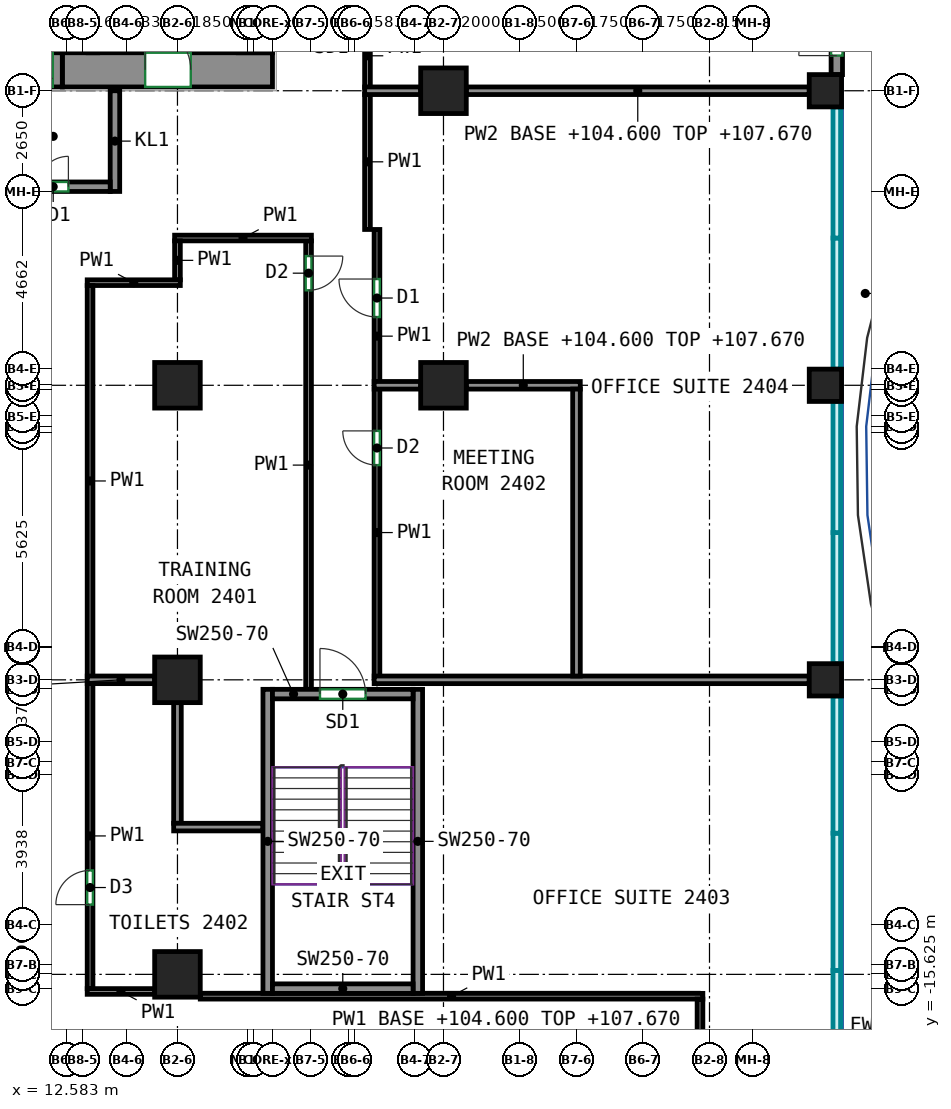
"""IFC4 building model, lengths in metres.
Left out: names, types, materials, properties, quantities, classifications, styles, units other than length and angle.
Written with IfcOpenShell. Run it as: python <this file> out.ifc"""

import sys

from ifc_helpers import new_model, si_unit, direction, frame, frame_2d, origin, origin_2d, place, context, subcontext, project, spatial, rectangle, extrude, source, transform, mapped, element, fill, save


model = new_model("IFC4")
c1 = context("Model", 3, precision=1e-05, world=origin(), true_north=direction((0.0, 1.0)))
c2 = subcontext(c1, "Body", "Model", "MODEL_VIEW")
j1 = project(units=[si_unit("LENGTHUNIT", "METRE"), si_unit("PLANEANGLEUNIT", "RADIAN")], contexts=[c1])
p1 = place(None, origin())
s1 = spatial("IfcSite", under=j1, at=p1, CompositionType="ELEMENT")
p2 = place(p1, origin())
s2 = spatial("IfcBuilding", under=s1, at=p2, CompositionType="ELEMENT")
p3 = place(p2, frame((0.0, 0.0, 104.6)))
s3 = spatial("IfcBuildingStorey", under=s2, at=p3, CompositionType="ELEMENT", Elevation=104.6)
m1 = source(origin(), c2, "Body", "SweptSolid", [
    extrude(rectangle(XDim=1.2, YDim=1.2, at=origin_2d()), origin(), (0.0, 0.0, 1.0), 3.72),
])
for number, where, z_axis, x_axis in (
    (1, (15.5, -15.25, 0.0), (0.0, 0.0, 1.0), (1.0, 0.0, 0.0)),
    (2, (15.5, -7.5, 0.0), (0.0, 0.0, 1.0), (1.0, 0.0, 0.0)),
    (3, (15.5, 0.25, 0.0), (0.0, 0.0, 1.0), (1.0, 0.0, 0.0)),
    (4, (22.5, 0.25, 0.0), (0.0, 0.0, 1.0), (1.0, 0.0, 0.0)),
    (5, (22.5, 8.0, 0.0), (0.0, 0.0, 1.0), (1.0, 0.0, 0.0)),
):
    element("IfcColumn", number, at=place(p3, frame(where, z_axis=z_axis, x_axis=x_axis)), inside=s3, PredefinedType="COLUMN", context=c2, shape_type="MappedRepresentation", body=[
        mapped(m1, transform((0.0, 0.0, 0.0))),
    ])
m2 = source(origin(), c2, "Body", "SweptSolid", [
    extrude(rectangle(XDim=0.85, YDim=0.85, at=origin_2d()), origin(), (0.0, 0.0, 1.0), 3.72),
])
for number, where, z_axis, x_axis in (
    (6, (32.55, -7.5, 0.0), (0.0, 0.0, 1.0), (1.0, 0.0, 0.0)),
    (7, (32.55, 0.25, 0.0), (0.0, 0.0, 1.0), (1.0, 0.0, 0.0)),
    (8, (32.55, 8.0, 0.0), (0.0, 0.0, 1.0), (1.0, 0.0, 0.0)),
):
    element("IfcColumn", number, at=place(p3, frame(where, z_axis=z_axis, x_axis=x_axis)), inside=s3, PredefinedType="COLUMN", context=c2, shape_type="MappedRepresentation", body=[
        mapped(m2, transform((0.0, 0.0, 0.0))),
    ])
m3 = source(origin(), c2, "Body", "SweptSolid", [
    extrude(rectangle(XDim=5.53, YDim=0.9, at=frame_2d((2.765, 0.0))), origin(), (0.0, 0.0, 1.0), 3.72),
])
p4 = place(p3, frame((12.47, 8.55, 0.0), z_axis=(0.0, 0.0, 1.0), x_axis=(1.0, 0.0, 0.0)))
e9 = element("IfcWall", 9, at=p4, inside=s3, PredefinedType="SHEAR", context=c2, shape_type="MappedRepresentation", body=[
    mapped(m3, transform((0.0, 0.0, 0.0))),
])
p5 = place(p4, frame((2.18, 0.0, 0.0)))
e10 = element("IfcOpeningElement", 10, at=p5, cuts=e9, PredefinedType="OPENING", context=c2, shape_type="SweptSolid", body=[
    extrude(rectangle(XDim=1.2, YDim=2.1, at=frame_2d((0.6, 1.05))), frame((0.0, 0.46, 0.0), z_axis=(0.0, -1.0, 0.0), x_axis=(1.0, 0.0, 0.0)), (0.0, 0.0, 1.0), 0.92),
])
m4 = source(origin(), c2, "Body", "SweptSolid", [
    extrude(rectangle(XDim=8.0, YDim=0.25, at=frame_2d((4.0, 0.0))), origin(), (0.0, 0.0, 1.0), 3.72),
])
for number, where, z_axis, x_axis in (
    (11, (17.875, -15.75, 0.0), (0.0, 0.0, 1.0), (0.0, 1.0, 0.0)),
    (12, (21.825, -15.75, 0.0), (0.0, 0.0, 1.0), (0.0, 1.0, 0.0)),
):
    element("IfcWall", number, at=place(p3, frame(where, z_axis=z_axis, x_axis=x_axis)), inside=s3, PredefinedType="SHEAR", context=c2, shape_type="MappedRepresentation", body=[
        mapped(m4, transform((0.0, 0.0, 0.0))),
    ])
m5 = source(origin(), c2, "Body", "SweptSolid", [
    extrude(rectangle(XDim=3.7, YDim=0.25, at=frame_2d((1.85, 0.0))), origin(), (0.0, 0.0, 1.0), 3.72),
])
p6 = place(p3, frame((18.0, -15.625, 0.0), z_axis=(0.0, 0.0, 1.0), x_axis=(1.0, 0.0, 0.0)))
e13 = element("IfcWall", 13, at=p6, inside=s3, PredefinedType="SHEAR", context=c2, shape_type="MappedRepresentation", body=[
    mapped(m5, transform((0.0, 0.0, 0.0))),
])
p7 = place(p3, frame((18.0, -7.875, 0.0), z_axis=(0.0, 0.0, 1.0), x_axis=(1.0, 0.0, 0.0)))
e14 = element("IfcWall", 14, at=p7, inside=s3, PredefinedType="SHEAR", context=c2, shape_type="MappedRepresentation", body=[
    mapped(m5, transform((0.0, 0.0, 0.0))),
])
p8 = place(p7, frame((1.25, 0.0, 0.0)))
e15 = element("IfcOpeningElement", 15, at=p8, cuts=e14, PredefinedType="OPENING", context=c2, shape_type="SweptSolid", body=[
    extrude(rectangle(XDim=1.2, YDim=2.1, at=frame_2d((0.6, 1.05))), frame((0.0, 0.135, 0.0), z_axis=(0.0, -1.0, 0.0), x_axis=(1.0, 0.0, 0.0)), (0.0, 0.0, 1.0), 0.27),
])
m6 = source(origin(), c2, "Body", "SweptSolid", [
    extrude(rectangle(XDim=2.0, YDim=0.3, at=frame_2d((1.0, 0.0))), origin(), (0.0, 0.0, 1.0), 3.72),
])
p9 = place(p3, frame((32.85, 8.425, 0.0), z_axis=(0.0, 0.0, 1.0), x_axis=(0.0, 1.0, 0.0)))
e16 = element("IfcWall", 16, at=p9, inside=s3, PredefinedType="SOLIDWALL", context=c2, shape_type="MappedRepresentation", body=[
    mapped(m6, transform((0.0, 0.0, 0.0))),
])
p10 = place(p9, frame((0.5, 0.0, 0.0)))
e17 = element("IfcOpeningElement", 17, at=p10, cuts=e16, PredefinedType="OPENING", context=c2, shape_type="SweptSolid", body=[
    extrude(rectangle(XDim=1.0, YDim=2.1, at=frame_2d((0.5, 1.05))), frame((0.0, 0.16, 0.0), z_axis=(0.0, -1.0, 0.0), x_axis=(1.0, 0.0, 0.0)), (0.0, 0.0, 1.0), 0.32),
])
m7 = source(origin(), c2, "Body", "SweptSolid", [
    extrude(rectangle(XDim=2.65, YDim=0.25, at=frame_2d((1.325, 0.0))), origin(), (0.0, 0.0, 1.0), 3.72),
])
p11 = place(p3, frame((13.855, 5.35, 0.0), z_axis=(0.0, 0.0, 1.0), x_axis=(0.0, 1.0, 0.0)))
e18 = element("IfcWall", 18, at=p11, inside=s3, PredefinedType="PARTITIONING", context=c2, shape_type="MappedRepresentation", body=[
    mapped(m7, transform((0.0, 0.0, 0.0))),
])
m8 = source(origin(), c2, "Body", "SweptSolid", [
    extrude(rectangle(XDim=3.0, YDim=0.25, at=frame_2d((1.5, 0.0))), origin(), (0.0, 0.0, 1.0), 3.72),
])
p12 = place(p3, frame((10.73, 5.475, 0.0), z_axis=(0.0, 0.0, 1.0), x_axis=(1.0, 0.0, 0.0)))
e19 = element("IfcWall", 19, at=p12, inside=s3, PredefinedType="PARTITIONING", context=c2, shape_type="MappedRepresentation", body=[
    mapped(m8, transform((0.0, 0.0, 0.0))),
])
p13 = place(p12, frame((1.1, 0.0, 0.0)))
e20 = element("IfcOpeningElement", 20, at=p13, cuts=e19, PredefinedType="OPENING", context=c2, shape_type="SweptSolid", body=[
    extrude(rectangle(XDim=0.8, YDim=2.0, at=frame_2d((0.4, 1.0))), frame((0.0, 0.135, 0.0), z_axis=(0.0, -1.0, 0.0), x_axis=(1.0, 0.0, 0.0)), (0.0, 0.0, 1.0), 0.27),
])
m9 = source(origin(), c2, "Body", "SweptSolid", [
    extrude(rectangle(XDim=1.4, YDim=0.9, at=frame_2d((0.7, 0.0))), origin(), (0.0, 0.0, 1.0), 2.7),
])
p14 = place(p3, frame((11.07, 8.55, 0.0), z_axis=(0.0, 0.0, 1.0), x_axis=(1.0, 0.0, 0.0)))
e21 = element("IfcWall", 21, at=p14, inside=s3, PredefinedType="PARTITIONING", context=c2, shape_type="MappedRepresentation", body=[
    mapped(m9, transform((0.0, 0.0, 0.0))),
])
p15 = place(p14, frame((0.25, 0.0, 0.0)))
e22 = element("IfcOpeningElement", 22, at=p15, cuts=e21, PredefinedType="OPENING", context=c2, shape_type="SweptSolid", body=[
    extrude(rectangle(XDim=0.9, YDim=2.1, at=frame_2d((0.45, 1.05))), frame((0.0, 0.46, 0.0), z_axis=(0.0, -1.0, 0.0), x_axis=(1.0, 0.0, 0.0)), (0.0, 0.0, 1.0), 0.92),
])
p16 = place(p3, frame((13.125, -15.7, 0.0), z_axis=(0.0, 0.0, 1.0), x_axis=(1.0, 0.0, 0.0)))
e23 = element("IfcWall", 23, at=p16, inside=s3, PredefinedType="PARTITIONING", context=c2, shape_type="SweptSolid", body=[
    extrude(rectangle(XDim=1.775, YDim=0.15, at=frame_2d((0.887, 0.0))), origin(), (0.0, 0.0, 1.0), 3.72),
])
p17 = place(p3, frame((16.1, -15.825, 0.0), z_axis=(0.0, 0.0, 1.0), x_axis=(1.0, 0.0, 0.0)))
e24 = element("IfcWall", 24, at=p17, inside=s3, PredefinedType="PARTITIONING", context=c2, shape_type="SweptSolid", body=[
    extrude(rectangle(XDim=13.225, YDim=0.15, at=frame_2d((6.612, 0.0))), origin(), (0.0, 0.0, 1.0), 3.72),
])
p18 = place(p3, frame((13.2, -15.625, 0.0), z_axis=(0.0, 0.0, 1.0), x_axis=(0.0, 1.0, 0.0)))
e25 = element("IfcWall", 25, at=p18, inside=s3, PredefinedType="PARTITIONING", context=c2, shape_type="SweptSolid", body=[
    extrude(rectangle(XDim=8.035, YDim=0.15, at=frame_2d((4.018, 0.0))), origin(), (0.0, 0.0, 1.0), 3.72),
])
p19 = place(p18, frame((2.21, 0.0, 0.0)))
e26 = element("IfcOpeningElement", 26, at=p19, cuts=e25, PredefinedType="OPENING", context=c2, shape_type="SweptSolid", body=[
    extrude(rectangle(XDim=0.9, YDim=2.1, at=frame_2d((0.45, 1.05))), frame((0.0, 0.085, 0.0), z_axis=(0.0, -1.0, 0.0), x_axis=(1.0, 0.0, 0.0)), (0.0, 0.0, 1.0), 0.17),
])
p20 = place(p3, frame((29.25, -18.125, 0.0), z_axis=(0.0, 0.0, 1.0), x_axis=(0.0, 1.0, 0.0)))
e27 = element("IfcWall", 27, at=p20, inside=s3, PredefinedType="PARTITIONING", context=c2, shape_type="SweptSolid", body=[
    extrude(rectangle(XDim=2.225, YDim=0.15, at=frame_2d((1.113, 0.0))), origin(), (0.0, 0.0, 1.0), 3.07),
])
p21 = place(p3, frame((18.95, 4.05, 0.0), z_axis=(0.0, 0.0, 1.0), x_axis=(0.0, -1.0, 0.0)))
e28 = element("IfcWall", 28, at=p21, inside=s3, PredefinedType="PARTITIONING", context=c2, shape_type="SweptSolid", body=[
    extrude(rectangle(XDim=11.8, YDim=0.15, at=frame_2d((5.9, 0.0))), origin(), (0.0, 0.0, 1.0), 3.72),
])
p22 = place(p21, frame((0.4, 0.0, 0.0)))
e29 = element("IfcOpeningElement", 29, at=p22, cuts=e28, PredefinedType="OPENING", context=c2, shape_type="SweptSolid", body=[
    extrude(rectangle(XDim=0.9, YDim=2.1, at=frame_2d((0.45, 1.05))), frame((0.0, 0.085, 0.0), z_axis=(0.0, -1.0, 0.0), x_axis=(1.0, 0.0, 0.0)), (0.0, 0.0, 1.0), 0.17),
])
p23 = place(p3, frame((15.425, 4.125, 0.0), z_axis=(0.0, 0.0, 1.0), x_axis=(1.0, 0.0, 0.0)))
e30 = element("IfcWall", 30, at=p23, inside=s3, PredefinedType="PARTITIONING", context=c2, shape_type="SweptSolid", body=[
    extrude(rectangle(XDim=3.6, YDim=0.15, at=frame_2d((1.8, 0.0))), origin(), (0.0, 0.0, 1.0), 3.72),
])
p24 = place(p3, frame((15.5, 3.025, 0.0), z_axis=(0.0, 0.0, 1.0), x_axis=(0.0, 1.0, 0.0)))
e31 = element("IfcWall", 31, at=p24, inside=s3, PredefinedType="PARTITIONING", context=c2, shape_type="SweptSolid", body=[
    extrude(rectangle(XDim=1.025, YDim=0.15, at=frame_2d((0.513, 0.0))), origin(), (0.0, 0.0, 1.0), 3.72),
])
p25 = place(p3, frame((13.125, 2.95, 0.0), z_axis=(0.0, 0.0, 1.0), x_axis=(1.0, 0.0, 0.0)))
e32 = element("IfcWall", 32, at=p25, inside=s3, PredefinedType="PARTITIONING", context=c2, shape_type="SweptSolid", body=[
    extrude(rectangle(XDim=2.45, YDim=0.15, at=frame_2d((1.225, 0.0))), origin(), (0.0, 0.0, 1.0), 3.72),
])
p26 = place(p3, frame((13.2, -7.41, 0.0), z_axis=(0.0, 0.0, 1.0), x_axis=(0.0, 1.0, 0.0)))
e33 = element("IfcWall", 33, at=p26, inside=s3, PredefinedType="PARTITIONING", context=c2, shape_type="SweptSolid", body=[
    extrude(rectangle(XDim=10.285, YDim=0.15, at=frame_2d((5.143, 0.0))), origin(), (0.0, 0.0, 1.0), 3.72),
])
p27 = place(p3, frame((20.75, -7.41, 0.0), z_axis=(0.0, 0.0, 1.0), x_axis=(0.0, 1.0, 0.0)))
e34 = element("IfcWall", 34, at=p27, inside=s3, PredefinedType="PARTITIONING", context=c2, shape_type="SweptSolid", body=[
    extrude(rectangle(XDim=7.57, YDim=0.15, at=frame_2d((3.785, 0.0))), origin(), (0.0, 0.0, 1.0), 3.72),
])
p28 = place(p27, frame((5.56, 0.0, 0.0)))
e35 = element("IfcOpeningElement", 35, at=p28, cuts=e34, PredefinedType="OPENING", context=c2, shape_type="SweptSolid", body=[
    extrude(rectangle(XDim=0.9, YDim=2.1, at=frame_2d((0.45, 1.05))), frame((0.0, 0.085, 0.0), z_axis=(0.0, -1.0, 0.0), x_axis=(1.0, 0.0, 0.0)), (0.0, 0.0, 1.0), 0.17),
])
p29 = place(p3, frame((20.5, 4.35, 0.0), z_axis=(0.0, 0.0, 1.0), x_axis=(0.0, 1.0, 0.0)))
e36 = element("IfcWall", 36, at=p29, inside=s3, PredefinedType="PARTITIONING", context=c2, shape_type="SweptSolid", body=[
    extrude(rectangle(XDim=3.56, YDim=0.15, at=frame_2d((1.78, 0.0))), origin(), (0.0, 0.0, 1.0), 3.72),
])
p30 = place(p3, frame((20.75, 0.34, 0.0), z_axis=(0.0, 0.0, 1.0), x_axis=(0.0, 1.0, 0.0)))
e37 = element("IfcWall", 37, at=p30, inside=s3, PredefinedType="PARTITIONING", context=c2, shape_type="SweptSolid", body=[
    extrude(rectangle(XDim=4.01, YDim=0.15, at=frame_2d((2.005, 0.0))), origin(), (0.0, 0.0, 1.0), 3.72),
])
p31 = place(p30, frame((1.706, 0.0, 0.0)))
e38 = element("IfcOpeningElement", 38, at=p31, cuts=e37, PredefinedType="OPENING", context=c2, shape_type="SweptSolid", body=[
    extrude(rectangle(XDim=1.0, YDim=2.1, at=frame_2d((0.5, 1.05))), frame((0.0, 0.085, 0.0), z_axis=(0.0, -1.0, 0.0), x_axis=(1.0, 0.0, 0.0)), (0.0, 0.0, 1.0), 0.17),
])
p32 = place(p3, frame((20.5, 8.09, 0.0), z_axis=(0.0, 0.0, 1.0), x_axis=(0.0, 1.0, 0.0)))
e39 = element("IfcWall", 39, at=p32, inside=s3, PredefinedType="PARTITIONING", context=c2, shape_type="SweptSolid", body=[
    extrude(rectangle(XDim=1.66, YDim=0.15, at=frame_2d((0.83, 0.0))), origin(), (0.0, 0.0, 1.0), 3.72),
])
p33 = place(p3, frame((13.126, -7.5, 0.0), z_axis=(0.0, 0.0, 1.0), x_axis=(1.0, 0.0, 0.0)))
e40 = element("IfcWall", 40, at=p33, inside=s3, PredefinedType="PARTITIONING", context=c2, shape_type="SweptSolid", body=[
    extrude(rectangle(XDim=1.774, YDim=0.2, at=frame_2d((0.887, 0.0))), origin(), (0.0, 0.0, 1.0), 3.07),
])
p34 = place(p3, frame((15.5, -11.275, 0.0), z_axis=(0.0, 0.0, 1.0), x_axis=(0.0, 1.0, 0.0)))
e41 = element("IfcWall", 41, at=p34, inside=s3, PredefinedType="PARTITIONING", context=c2, shape_type="SweptSolid", body=[
    extrude(rectangle(XDim=3.175, YDim=0.2, at=frame_2d((1.587, 0.0))), origin(), (0.0, 0.0, 1.0), 3.72),
])
p35 = place(p3, frame((17.75, -11.375, 0.0), z_axis=(0.0, 0.0, 1.0), x_axis=(-1.0, 0.0, 0.0)))
e42 = element("IfcWall", 42, at=p35, inside=s3, PredefinedType="PARTITIONING", context=c2, shape_type="SweptSolid", body=[
    extrude(rectangle(XDim=2.35, YDim=0.2, at=frame_2d((1.175, 0.0))), origin(), (0.0, 0.0, 1.0), 3.72),
])
p36 = place(p3, frame((20.676, -7.5, 0.0), z_axis=(0.0, 0.0, 1.0), x_axis=(1.0, 0.0, 0.0)))
e43 = element("IfcWall", 43, at=p36, inside=s3, PredefinedType="PARTITIONING", context=c2, shape_type="SweptSolid", body=[
    extrude(rectangle(XDim=11.449, YDim=0.2, at=frame_2d((5.725, 0.0))), origin(), (0.0, 0.0, 1.0), 3.72),
])
p37 = place(p3, frame((20.676, 0.25, 0.0), z_axis=(0.0, 0.0, 1.0), x_axis=(1.0, 0.0, 0.0)))
e44 = element("IfcWall", 44, at=p37, inside=s3, PredefinedType="PARTITIONING", context=c2, shape_type="SweptSolid", body=[
    extrude(rectangle(XDim=1.224, YDim=0.2, at=frame_2d((0.612, 0.0))), origin(), (0.0, 0.0, 1.0), 3.72),
])
p38 = place(p3, frame((23.1, 0.25, 0.0), z_axis=(0.0, 0.0, 1.0), x_axis=(1.0, 0.0, 0.0)))
e45 = element("IfcWall", 45, at=p38, inside=s3, PredefinedType="PARTITIONING", context=c2, shape_type="SweptSolid", body=[
    extrude(rectangle(XDim=3.0, YDim=0.2, at=frame_2d((1.5, 0.0))), origin(), (0.0, 0.0, 1.0), 3.07),
])
p39 = place(p3, frame((26.0, -7.4, 0.0), z_axis=(0.0, 0.0, 1.0), x_axis=(0.0, 1.0, 0.0)))
e46 = element("IfcWall", 46, at=p39, inside=s3, PredefinedType="PARTITIONING", context=c2, shape_type="SweptSolid", body=[
    extrude(rectangle(XDim=7.55, YDim=0.2, at=frame_2d((3.775, 0.0))), origin(), (0.0, 0.0, 1.0), 3.72),
])
p40 = place(p3, frame((20.426, 8.0, 0.0), z_axis=(0.0, 0.0, 1.0), x_axis=(1.0, 0.0, 0.0)))
e47 = element("IfcWall", 47, at=p40, inside=s3, PredefinedType="PARTITIONING", context=c2, shape_type="SweptSolid", body=[
    extrude(rectangle(XDim=1.474, YDim=0.2, at=frame_2d((0.737, 0.0))), origin(), (0.0, 0.0, 1.0), 3.72),
])
p41 = place(p3, frame((23.1, 8.0, 0.0), z_axis=(0.0, 0.0, 1.0), x_axis=(1.0, 0.0, 0.0)))
e48 = element("IfcWall", 48, at=p41, inside=s3, PredefinedType="PARTITIONING", context=c2, shape_type="SweptSolid", body=[
    extrude(rectangle(XDim=9.025, YDim=0.2, at=frame_2d((4.512, 0.0))), origin(), (0.0, 0.0, 1.0), 3.07),
])
p42 = place(p10, origin())
e49 = element("IfcDoor", 49, at=p42, inside=s3, OperationType="SINGLE_SWING_LEFT", PredefinedType="DOOR", context=c2, shape_type="SweptSolid", body=[
    extrude(rectangle(XDim=1.0, YDim=2.1, at=frame_2d((0.5, 1.05))), frame((0.0, 0.025, 0.0), z_axis=(0.0, -1.0, 0.0), x_axis=(1.0, 0.0, 0.0)), (0.0, 0.0, 1.0), 0.05),
])
fill(e17, e49)
p43 = place(p13, origin())
e50 = element("IfcDoor", 50, at=p43, inside=s3, OperationType="SINGLE_SWING_RIGHT", PredefinedType="DOOR", context=c2, shape_type="SweptSolid", body=[
    extrude(rectangle(XDim=0.8, YDim=2.0, at=frame_2d((0.4, 1.0))), frame((0.0, 0.025, 0.0), z_axis=(0.0, -1.0, 0.0), x_axis=(1.0, 0.0, 0.0)), (0.0, 0.0, 1.0), 0.05),
])
fill(e20, e50)
p44 = place(p15, origin())
e51 = element("IfcDoor", 51, at=p44, inside=s3, OperationType="SLIDING_TO_LEFT", PredefinedType="DOOR", context=c2, shape_type="SweptSolid", body=[
    extrude(rectangle(XDim=0.9, YDim=2.1, at=frame_2d((0.45, 1.05))), frame((0.0, 0.355, 0.0), z_axis=(0.0, -1.0, 0.0), x_axis=(1.0, 0.0, 0.0)), (0.0, 0.0, 1.0), 0.05),
])
fill(e22, e51)
p45 = place(p5, origin())
e52 = element("IfcDoor", 52, at=p45, inside=s3, OperationType="DOUBLE_DOOR_SINGLE_SWING", PredefinedType="DOOR", context=c2, shape_type="SweptSolid", body=[
    extrude(rectangle(XDim=1.2, YDim=2.1, at=frame_2d((0.6, 1.05))), frame((0.0, 0.355, 0.0), z_axis=(0.0, -1.0, 0.0), x_axis=(1.0, 0.0, 0.0)), (0.0, 0.0, 1.0), 0.05),
])
fill(e10, e52)
p46 = place(p8, origin())
e53 = element("IfcDoor", 53, at=p46, inside=s3, OperationType="DOUBLE_DOOR_SINGLE_SWING", PredefinedType="DOOR", context=c2, shape_type="SweptSolid", body=[
    extrude(rectangle(XDim=1.2, YDim=2.1, at=frame_2d((0.6, 1.05))), frame((0.0, 0.025, 0.0), z_axis=(0.0, -1.0, 0.0), x_axis=(1.0, 0.0, 0.0)), (0.0, 0.0, 1.0), 0.05),
])
fill(e15, e53)
p47 = place(p19, origin())
e54 = element("IfcDoor", 54, at=p47, inside=s3, OperationType="SINGLE_SWING_LEFT", PredefinedType="DOOR", context=c2, shape_type="SweptSolid", body=[
    extrude(rectangle(XDim=0.9, YDim=2.1, at=frame_2d((0.45, 1.05))), frame((0.0, 0.025, 0.0), z_axis=(0.0, -1.0, 0.0), x_axis=(1.0, 0.0, 0.0)), (0.0, 0.0, 1.0), 0.05),
])
fill(e26, e54)
p48 = place(p28, origin())
e55 = element("IfcDoor", 55, at=p48, inside=s3, OperationType="SINGLE_SWING_RIGHT", PredefinedType="DOOR", context=c2, shape_type="SweptSolid", body=[
    extrude(rectangle(XDim=0.9, YDim=2.1, at=frame_2d((0.45, 1.05))), frame((0.0, 0.025, 0.0), z_axis=(0.0, -1.0, 0.0), x_axis=(1.0, 0.0, 0.0)), (0.0, 0.0, 1.0), 0.05),
])
fill(e35, e55)
p49 = place(p31, origin())
e56 = element("IfcDoor", 56, at=p49, inside=s3, OperationType="SINGLE_SWING_RIGHT", PredefinedType="DOOR", context=c2, shape_type="SweptSolid", body=[
    extrude(rectangle(XDim=1.0, YDim=2.1, at=frame_2d((0.5, 1.05))), frame((0.0, 0.025, 0.0), z_axis=(0.0, -1.0, 0.0), x_axis=(1.0, 0.0, 0.0)), (0.0, 0.0, 1.0), 0.05),
])
fill(e38, e56)
p50 = place(p22, origin())
e57 = element("IfcDoor", 57, at=p50, inside=s3, OperationType="SINGLE_SWING_LEFT", PredefinedType="DOOR", context=c2, shape_type="SweptSolid", body=[
    extrude(rectangle(XDim=0.9, YDim=2.1, at=frame_2d((0.45, 1.05))), frame((0.0, 0.025, 0.0), z_axis=(0.0, -1.0, 0.0), x_axis=(1.0, 0.0, 0.0)), (0.0, 0.0, 1.0), 0.05),
])
fill(e29, e57)
save(model, sys.argv[1])
